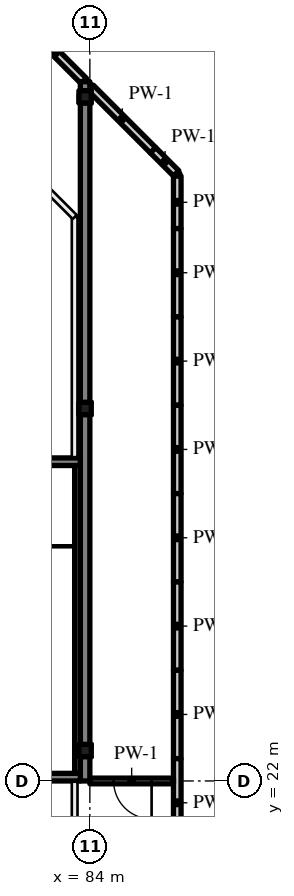
"""IFC4 building model, lengths in metres.
Left out: names, types, materials, properties, quantities, classifications, styles, units other than length and angle.
Written with IfcOpenShell. Run it as: python <this file> out.ifc"""

import sys

from ifc_helpers import new_model, si_unit, direction, frame, frame_2d, origin, origin_2d, place, context, subcontext, project, spatial, rectangle, hollow_circle, extrude, source, transform, mapped, element, fill, save


model = new_model("IFC4")
c1 = context("Model", 3, precision=1e-05, world=origin(), true_north=direction((0.0, 1.0)))
c2 = subcontext(c1, "Body", "Model", "MODEL_VIEW")
j1 = project(units=[si_unit("LENGTHUNIT", "METRE"), si_unit("PLANEANGLEUNIT", "RADIAN")], contexts=[c1])
p1 = place(None, origin())
s1 = spatial("IfcSite", under=j1, at=p1, CompositionType="ELEMENT")
p2 = place(p1, origin())
s2 = spatial("IfcBuilding", under=s1, at=p2, CompositionType="ELEMENT")
p3 = place(p2, frame((0.0, 0.0, 329.7)))
s3 = spatial("IfcBuildingStorey", under=s2, at=p3, CompositionType="ELEMENT", Elevation=329.7)
m1 = source(origin(), c2, "Body", "SweptSolid", [
    extrude(rectangle(XDim=18.4, YDim=0.25, at=frame_2d((9.2, 0.0))), origin(), (0.0, 0.0, 1.0), 4.72),
])
p4 = place(p3, frame((83.875, 22.0, 0.0), z_axis=(0.0, 0.0, 1.0), x_axis=(0.0, 1.0, 0.0)))
e1 = element("IfcWall", 1, at=p4, inside=s3, PredefinedType="SHEAR", context=c2, shape_type="MappedRepresentation", body=[
    mapped(m1, transform((0.0, 0.0, 0.0), scale=1.0)),
])
m2 = source(origin(), c2, "Body", "SweptSolid", [
    extrude(hollow_circle(Radius=0.162, WallThickness=0.012, at=origin_2d()), origin(), (0.0, 0.0, 1.0), 4.4),
])
for number, where, z_axis, x_axis in (
    (2, (83.875, 22.8, 5.0), (0.0, 0.0, 1.0), (1.0, 0.0, 0.0)),
    (3, (83.875, 31.8, 5.0), (0.0, 0.0, 1.0), (1.0, 0.0, 0.0)),
    (4, (83.875, 40.0, 5.0), (0.0, 0.0, 1.0), (1.0, 0.0, 0.0)),
):
    element("IfcColumn", number, at=place(p3, frame(where, z_axis=z_axis, x_axis=x_axis)), inside=s3, PredefinedType="COLUMN", context=c2, shape_type="MappedRepresentation", body=[
        mapped(m2, transform((0.0, 0.0, 0.0), scale=1.0)),
    ])
m3 = source(origin(), c2, "Body", "SweptSolid", [
    extrude(rectangle(XDim=2.093, YDim=0.2, at=frame_2d((1.046, 0.0))), origin(), (0.0, 0.0, 1.0), 1.1),
])
p5 = place(p3, frame((82.359, 41.9, 0.0), z_axis=(0.0, 0.0, 1.0), x_axis=(0.707106781187, -0.707106781187, 0.0)))
e5 = element("IfcWall", 5, at=p5, inside=s3, PredefinedType="PARAPET", context=c2, shape_type="MappedRepresentation", body=[
    mapped(m3, transform((0.0, 0.0, 0.0), scale=1.0)),
])
m4 = source(origin(), c2, "Body", "SweptSolid", [
    extrude(rectangle(XDim=2.324, YDim=0.2, at=frame_2d((1.162, 0.0))), origin(), (0.0, 0.0, 1.0), 1.1),
])
p6 = place(p3, frame((84.02, 40.239, 0.0), z_axis=(0.0, 0.0, 1.0), x_axis=(0.707106781187, -0.707106781187, 0.0)))
e6 = element("IfcWall", 6, at=p6, inside=s3, PredefinedType="PARAPET", context=c2, shape_type="MappedRepresentation", body=[
    mapped(m4, transform((0.0, 0.0, 0.0), scale=1.0)),
])
m5 = source(origin(), c2, "Body", "SweptSolid", [
    extrude(rectangle(XDim=0.859, YDim=0.2, at=frame_2d((0.429, 0.0))), origin(), (0.0, 0.0, 1.0), 1.1),
])
p7 = place(p3, frame((85.664, 38.595, 0.0), z_axis=(0.0, 0.0, 1.0), x_axis=(0.707106781187, -0.707106781187, 0.0)))
e7 = element("IfcWall", 7, at=p7, inside=s3, PredefinedType="PARAPET", context=c2, shape_type="MappedRepresentation", body=[
    mapped(m5, transform((0.0, 0.0, 0.0), scale=1.0)),
])
m6 = source(origin(), c2, "Body", "SweptSolid", [
    extrude(rectangle(XDim=1.383, YDim=0.2, at=frame_2d((0.691, 0.0))), origin(), (0.0, 0.0, 1.0), 1.1),
])
p8 = place(p3, frame((86.3, 37.917, 0.0), z_axis=(0.0, 0.0, 1.0), x_axis=(0.0, -1.0, 0.0)))
e8 = element("IfcWall", 8, at=p8, inside=s3, PredefinedType="PARAPET", context=c2, shape_type="MappedRepresentation", body=[
    mapped(m6, transform((0.0, 0.0, 0.0), scale=1.0)),
])
m7 = source(origin(), c2, "Body", "SweptSolid", [
    extrude(rectangle(XDim=2.324, YDim=0.2, at=frame_2d((1.162, 0.0))), origin(), (0.0, 0.0, 1.0), 1.1),
])
p9 = place(p3, frame((86.3, 36.534, 0.0), z_axis=(0.0, 0.0, 1.0), x_axis=(0.0, -1.0, 0.0)))
e9 = element("IfcWall", 9, at=p9, inside=s3, PredefinedType="PARAPET", context=c2, shape_type="MappedRepresentation", body=[
    mapped(m7, transform((0.0, 0.0, 0.0), scale=1.0)),
])
p10 = place(p3, frame((86.3, 34.21, 0.0), z_axis=(0.0, 0.0, 1.0), x_axis=(0.0, -1.0, 0.0)))
e10 = element("IfcWall", 10, at=p10, inside=s3, PredefinedType="PARAPET", context=c2, shape_type="MappedRepresentation", body=[
    mapped(m4, transform((0.0, 0.0, 0.0), scale=1.0)),
])
for number, where, z_axis, x_axis in (
    (11, (86.3, 31.885, 0.0), (0.0, 0.0, 1.0), (0.0, -1.0, 0.0)),
    (12, (86.3, 29.561, 0.0), (0.0, 0.0, 1.0), (0.0, -1.0, 0.0)),
    (13, (86.3, 27.237, 0.0), (0.0, 0.0, 1.0), (0.0, -1.0, 0.0)),
):
    element("IfcWall", number, at=place(p3, frame(where, z_axis=z_axis, x_axis=x_axis)), inside=s3, PredefinedType="PARAPET", context=c2, shape_type="MappedRepresentation", body=[
        mapped(m7, transform((0.0, 0.0, 0.0), scale=1.0)),
    ])
p11 = place(p3, frame((86.3, 24.912, 0.0), z_axis=(0.0, 0.0, 1.0), x_axis=(0.0, -1.0, 0.0)))
e14 = element("IfcWall", 14, at=p11, inside=s3, PredefinedType="PARAPET", context=c2, shape_type="MappedRepresentation", body=[
    mapped(m4, transform((0.0, 0.0, 0.0), scale=1.0)),
])
p12 = place(p3, frame((86.3, 22.588, 0.0), z_axis=(0.0, 0.0, 1.0), x_axis=(0.0, -1.0, 0.0)))
e15 = element("IfcWall", 15, at=p12, inside=s3, PredefinedType="PARAPET", context=c2, shape_type="MappedRepresentation", body=[
    mapped(m7, transform((0.0, 0.0, 0.0), scale=1.0)),
])
m8 = source(origin(), c2, "Body", "SweptSolid", [
    extrude(rectangle(XDim=8.15, YDim=0.2, at=frame_2d((4.075, 0.0))), origin(), (0.0, 0.0, 1.0), 4.72),
])
p13 = place(p3, frame((83.75, 22.1, 0.0), z_axis=(0.0, 0.0, 1.0), x_axis=(-1.0, 0.0, 0.0)))
e16 = element("IfcWall", 16, at=p13, inside=s3, PredefinedType="SOLIDWALL", context=c2, shape_type="MappedRepresentation", body=[
    mapped(m8, transform((0.0, 0.0, 0.0), scale=1.0)),
])
m9 = source(origin(), c2, "Body", "SweptSolid", [
    extrude(rectangle(XDim=1.2, YDim=2.1, at=frame_2d((0.6, 1.05))), frame((0.0, 0.11, 0.0), z_axis=(0.0, -1.0, 0.0), x_axis=(1.0, 0.0, 0.0)), (0.0, 0.0, 1.0), 0.22),
])
p14 = place(p13, frame((5.95, 0.0, 0.0)))
e17 = element("IfcOpeningElement", 17, at=p14, cuts=e16, PredefinedType="OPENING", context=c2, shape_type="MappedRepresentation", body=[
    mapped(m9, transform((0.0, 0.0, 0.0), scale=1.0)),
])
p15 = place(p3, frame((83.75, 30.4, 0.0), z_axis=(0.0, 0.0, 1.0), x_axis=(-1.0, 0.0, 0.0)))
e18 = element("IfcWall", 18, at=p15, inside=s3, PredefinedType="SOLIDWALL", context=c2, shape_type="MappedRepresentation", body=[
    mapped(m8, transform((0.0, 0.0, 0.0), scale=1.0)),
])
m10 = source(origin(), c2, "Body", "SweptSolid", [
    extrude(rectangle(XDim=1.0, YDim=2.1, at=frame_2d((0.5, 1.05))), frame((0.0, 0.11, 0.0), z_axis=(0.0, -1.0, 0.0), x_axis=(1.0, 0.0, 0.0)), (0.0, 0.0, 1.0), 0.22),
])
p16 = place(p15, frame((6.05, 0.0, 0.0)))
e19 = element("IfcOpeningElement", 19, at=p16, cuts=e18, PredefinedType="OPENING", context=c2, shape_type="MappedRepresentation", body=[
    mapped(m10, transform((0.0, 0.0, 0.0), scale=1.0)),
])
m11 = source(origin(), c2, "Body", "SweptSolid", [
    extrude(rectangle(XDim=8.1, YDim=0.15, at=frame_2d((4.05, 0.0))), origin(), (0.0, 0.0, 1.0), 4.72),
])
p17 = place(p3, frame((83.675, 22.2, 0.0), z_axis=(0.0, 0.0, 1.0), x_axis=(0.0, 1.0, 0.0)))
e20 = element("IfcWall", 20, at=p17, inside=s3, PredefinedType="SOLIDWALL", context=c2, shape_type="MappedRepresentation", body=[
    mapped(m11, transform((0.0, 0.0, 0.0), scale=1.0)),
])
m12 = source(origin(), c2, "Body", "SweptSolid", [
    extrude(rectangle(XDim=2.2, YDim=0.15, at=frame_2d((1.1, 0.0))), origin(), (0.0, 0.0, 1.0), 4.02),
])
p18 = place(p3, frame((84.0, 22.0, 0.0), z_axis=(0.0, 0.0, 1.0), x_axis=(1.0, 0.0, 0.0)))
e21 = element("IfcWall", 21, at=p18, inside=s3, PredefinedType="PARTITIONING", context=c2, shape_type="MappedRepresentation", body=[
    mapped(m12, transform((0.0, 0.0, 0.0), scale=1.0)),
])
m13 = source(origin(), c2, "Body", "SweptSolid", [
    extrude(rectangle(XDim=1.0, YDim=2.1, at=frame_2d((0.5, 1.05))), frame((0.0, 0.085, 0.0), z_axis=(0.0, -1.0, 0.0), x_axis=(1.0, 0.0, 0.0)), (0.0, 0.0, 1.0), 0.17),
])
p19 = place(p18, frame((0.625, 0.0, 0.0)))
e22 = element("IfcOpeningElement", 22, at=p19, cuts=e21, PredefinedType="OPENING", context=c2, shape_type="MappedRepresentation", body=[
    mapped(m13, transform((0.0, 0.0, 0.0), scale=1.0)),
])
m14 = source(origin(), c2, "Body", "SweptSolid", [
    extrude(rectangle(XDim=1.0, YDim=2.1, at=frame_2d((0.5, 1.05))), frame((0.0, 0.025, 0.0), z_axis=(0.0, -1.0, 0.0), x_axis=(1.0, 0.0, 0.0)), (0.0, 0.0, 1.0), 0.05),
])
p20 = place(p19, origin())
e23 = element("IfcDoor", 23, at=p20, inside=s3, OperationType="SINGLE_SWING_RIGHT", PredefinedType="DOOR", context=c2, shape_type="MappedRepresentation", body=[
    mapped(m14, transform((0.0, 0.0, 0.0), scale=1.0)),
])
fill(e22, e23)
save(model, sys.argv[1])
